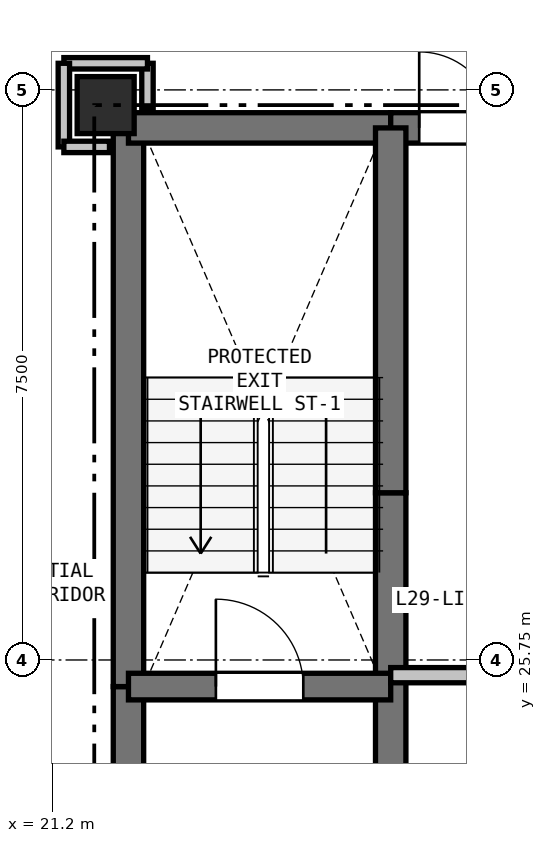
"""IFC4 building model, lengths in metres.
Left out: names, types, materials, properties, quantities, classifications, styles, units other than length and angle.
Written with IfcOpenShell. Run it as: python <this file> out.ifc"""

import sys

from ifc_helpers import new_model, si_unit, direction, frame, frame_2d, origin, origin_2d, place, context, subcontext, project, spatial, rectangle, extrude, element, fill, save


model = new_model("IFC4")
c1 = context("Model", 3, precision=1e-05, world=origin(), true_north=direction((0.0, 1.0)))
c2 = subcontext(c1, "Body", "Model", "MODEL_VIEW")
j1 = project(units=[si_unit("LENGTHUNIT", "METRE"), si_unit("PLANEANGLEUNIT", "RADIAN")], contexts=[c1])
p1 = place(None, origin())
s1 = spatial("IfcSite", under=j1, at=p1, CompositionType="ELEMENT")
p2 = place(p1, origin())
s2 = spatial("IfcBuilding", under=s1, at=p2, CompositionType="ELEMENT")
p3 = place(p2, frame((0.0, 0.0, 106.5)))
s3 = spatial("IfcBuildingStorey", under=s2, at=p3, CompositionType="ELEMENT", Elevation=106.5)
p4 = place(p3, frame((21.9, 33.05, 0.0), z_axis=(0.0, 0.0, 1.0), x_axis=(1.0, 0.0, 0.0)))
e1 = element("IfcColumn", 1, at=p4, inside=s3, PredefinedType="COLUMN", context=c2, shape_type="SweptSolid", body=[
    extrude(rectangle(XDim=0.75, YDim=0.75, at=origin_2d()), origin(), (0.0, 0.0, 1.0), 3.3),
])
p5 = place(p3, frame((22.2, 20.75, 0.0), z_axis=(0.0, 0.0, 1.0), x_axis=(0.0, 1.0, 0.0)))
e2 = element("IfcWall", 2, at=p5, inside=s3, PredefinedType="SHEAR", context=c2, shape_type="SweptSolid", body=[
    extrude(rectangle(XDim=4.65, YDim=0.4, at=frame_2d((2.325, 0.0))), origin(), (0.0, 0.0, 1.0), 3.05),
])
p6 = place(p3, frame((22.2, 25.4, 0.0), z_axis=(0.0, 0.0, 1.0), x_axis=(0.0, 1.0, 0.0)))
e3 = element("IfcWall", 3, at=p6, inside=s3, PredefinedType="SHEAR", context=c2, shape_type="SweptSolid", body=[
    extrude(rectangle(XDim=7.35, YDim=0.4, at=frame_2d((3.675, 0.0))), origin(), (0.0, 0.0, 1.0), 3.05),
])
p7 = place(p3, frame((22.2, 32.75, 0.0), z_axis=(0.0, 0.0, 1.0), x_axis=(1.0, 0.0, 0.0)))
e4 = element("IfcWall", 4, at=p7, inside=s3, PredefinedType="SHEAR", context=c2, shape_type="SweptSolid", body=[
    extrude(rectangle(XDim=3.45, YDim=0.4, at=frame_2d((1.725, 0.0))), origin(), (0.0, 0.0, 1.0), 3.05),
])
p8 = place(p3, frame((25.65, 32.75, 0.0), z_axis=(0.0, 0.0, 1.0), x_axis=(1.0, 0.0, 0.0)))
e5 = element("IfcWall", 5, at=p8, inside=s3, PredefinedType="SHEAR", context=c2, shape_type="SweptSolid", body=[
    extrude(rectangle(XDim=1.75, YDim=0.4, at=frame_2d((0.875, 0.0))), origin(), (0.0, 0.0, 1.0), 3.05),
])
p9 = place(p8, frame((0.375, 0.0, 0.0)))
e6 = element("IfcOpeningElement", 6, at=p9, cuts=e5, PredefinedType="OPENING", context=c2, shape_type="SweptSolid", body=[
    extrude(rectangle(XDim=1.0, YDim=2.15, at=frame_2d((0.5, 1.075))), frame((0.0, 0.21, 0.0), z_axis=(0.0, -1.0, 0.0), x_axis=(1.0, 0.0, 0.0)), (0.0, 0.0, 1.0), 0.42),
])
p10 = place(p3, frame((25.65, 22.75, 0.0), z_axis=(0.0, 0.0, 1.0), x_axis=(0.0, 1.0, 0.0)))
e7 = element("IfcWall", 7, at=p10, inside=s3, PredefinedType="SHEAR", context=c2, shape_type="SweptSolid", body=[
    extrude(rectangle(XDim=2.8, YDim=0.4, at=frame_2d((1.4, 0.0))), origin(), (0.0, 0.0, 1.0), 3.05),
])
p11 = place(p3, frame((25.65, 25.55, 0.0), z_axis=(0.0, 0.0, 1.0), x_axis=(0.0, 1.0, 0.0)))
e8 = element("IfcWall", 8, at=p11, inside=s3, PredefinedType="SHEAR", context=c2, shape_type="SweptSolid", body=[
    extrude(rectangle(XDim=2.4, YDim=0.4, at=frame_2d((1.2, 0.0))), origin(), (0.0, 0.0, 1.0), 3.05),
])
p12 = place(p3, frame((25.65, 27.95, 0.0), z_axis=(0.0, 0.0, 1.0), x_axis=(0.0, 1.0, 0.0)))
e9 = element("IfcWall", 9, at=p12, inside=s3, PredefinedType="SHEAR", context=c2, shape_type="SweptSolid", body=[
    extrude(rectangle(XDim=4.8, YDim=0.4, at=frame_2d((2.4, 0.0))), origin(), (0.0, 0.0, 1.0), 3.05),
])
p13 = place(p3, frame((22.2, 25.4, 0.0), z_axis=(0.0, 0.0, 1.0), x_axis=(1.0, 0.0, 0.0)))
e10 = element("IfcWall", 10, at=p13, inside=s3, PredefinedType="SHEAR", context=c2, shape_type="SweptSolid", body=[
    extrude(rectangle(XDim=3.45, YDim=0.35, at=frame_2d((1.725, 0.0))), origin(), (0.0, 0.0, 1.0), 3.05),
])
p14 = place(p13, frame((1.15, 0.0, 0.0)))
e11 = element("IfcOpeningElement", 11, at=p14, cuts=e10, PredefinedType="OPENING", context=c2, shape_type="SweptSolid", body=[
    extrude(rectangle(XDim=1.15, YDim=2.15, at=frame_2d((0.575, 1.075))), frame((0.0, 0.185, 0.0), z_axis=(0.0, -1.0, 0.0), x_axis=(1.0, 0.0, 0.0)), (0.0, 0.0, 1.0), 0.37),
])
p15 = place(p3, frame((25.65, 25.55, 0.0), z_axis=(0.0, 0.0, 1.0), x_axis=(1.0, 0.0, 0.0)))
e12 = element("IfcWall", 12, at=p15, inside=s3, PredefinedType="PARTITIONING", context=c2, shape_type="SweptSolid", body=[
    extrude(rectangle(XDim=4.95, YDim=0.2, at=frame_2d((2.475, 0.0))), origin(), (0.0, 0.0, 1.0), 3.05),
])
p16 = place(p3, frame((22.45, 33.0, 0.0), z_axis=(0.0, 0.0, 1.0), x_axis=(0.0, 1.0, 0.0)))
e13 = element("IfcWall", 13, at=p16, inside=s3, PredefinedType="PARTITIONING", context=c2, shape_type="SweptSolid", body=[
    extrude(rectangle(XDim=0.6, YDim=0.15, at=frame_2d((0.3, 0.0))), origin(), (0.0, 0.0, 1.0), 2.498),
])
p17 = place(p3, frame((22.45, 33.6, 0.0), z_axis=(0.0, 0.0, 1.0), x_axis=(-1.0, 0.0, 0.0)))
e14 = element("IfcWall", 14, at=p17, inside=s3, PredefinedType="PARTITIONING", context=c2, shape_type="SweptSolid", body=[
    extrude(rectangle(XDim=1.1, YDim=0.15, at=frame_2d((0.55, 0.0))), origin(), (0.0, 0.0, 1.0), 3.05),
])
p18 = place(p3, frame((21.35, 33.6, 0.0), z_axis=(0.0, 0.0, 1.0), x_axis=(0.0, -1.0, 0.0)))
e15 = element("IfcWall", 15, at=p18, inside=s3, PredefinedType="PARTITIONING", context=c2, shape_type="SweptSolid", body=[
    extrude(rectangle(XDim=1.1, YDim=0.15, at=frame_2d((0.55, 0.0))), origin(), (0.0, 0.0, 1.0), 2.423),
])
p19 = place(p3, frame((21.35, 32.5, 0.0), z_axis=(0.0, 0.0, 1.0), x_axis=(1.0, 0.0, 0.0)))
e16 = element("IfcWall", 16, at=p19, inside=s3, PredefinedType="PARTITIONING", context=c2, shape_type="SweptSolid", body=[
    extrude(rectangle(XDim=0.6, YDim=0.15, at=frame_2d((0.3, 0.0))), origin(), (0.0, 0.0, 1.0), 2.498),
])
p20 = place(p9, origin())
e17 = element("IfcDoor", 17, at=p20, inside=s3, OperationType="SINGLE_SWING_LEFT", PredefinedType="DOOR", context=c2, shape_type="SweptSolid", body=[
    extrude(rectangle(XDim=1.0, YDim=2.15, at=frame_2d((0.5, 1.075))), frame((0.0, 0.025, 0.0), z_axis=(0.0, -1.0, 0.0), x_axis=(1.0, 0.0, 0.0)), (0.0, 0.0, 1.0), 0.05),
])
fill(e6, e17)
p21 = place(p14, origin())
e18 = element("IfcDoor", 18, at=p21, inside=s3, OperationType="SINGLE_SWING_LEFT", PredefinedType="DOOR", context=c2, shape_type="SweptSolid", body=[
    extrude(rectangle(XDim=1.15, YDim=2.15, at=frame_2d((0.575, 1.075))), frame((0.0, 0.025, 0.0), z_axis=(0.0, -1.0, 0.0), x_axis=(1.0, 0.0, 0.0)), (0.0, 0.0, 1.0), 0.05),
])
fill(e11, e18)
save(model, sys.argv[1])
